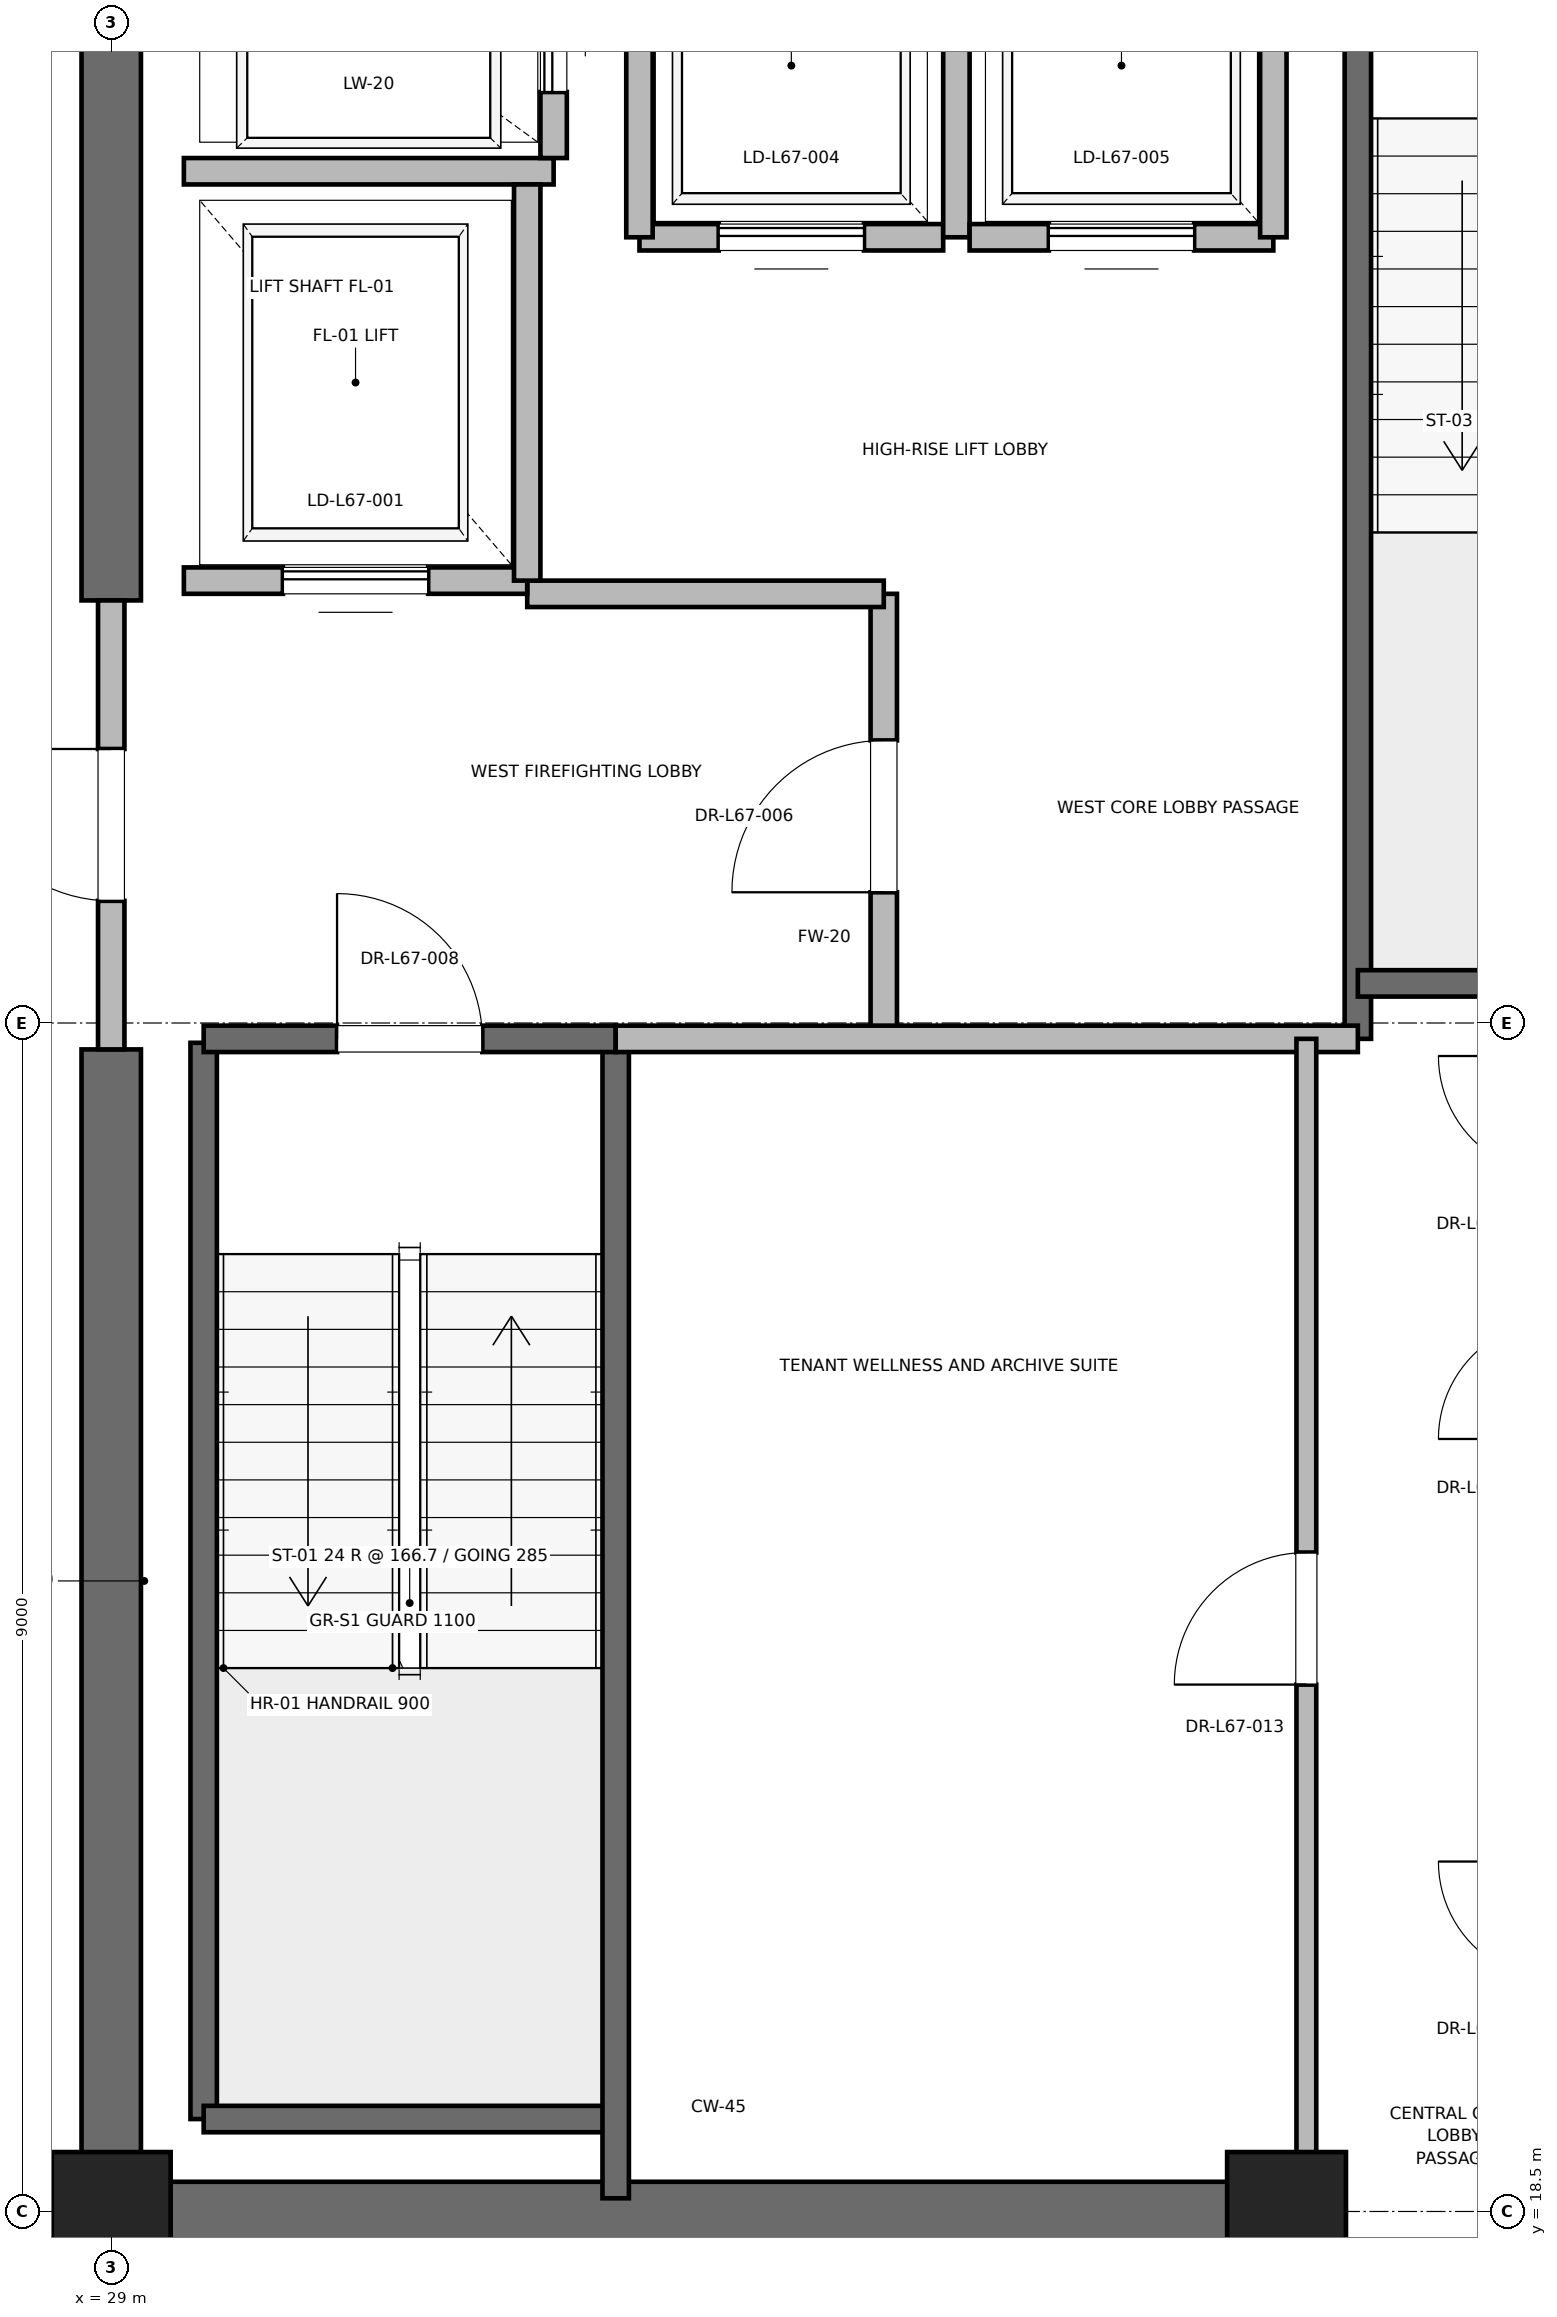
"""IFC4 building model, lengths in metres.
Left out: names, types, materials, properties, quantities, classifications, styles, units other than length and angle.
Written with IfcOpenShell. Run it as: python <this file> out.ifc"""

import sys

from ifc_helpers import new_model, si_unit, direction, frame, frame_2d, origin, origin_2d, place, context, subcontext, project, spatial, rectangle, extrude, element, fill, save


model = new_model("IFC4")
c1 = context("Model", 3, precision=1e-05, world=origin(), true_north=direction((0.0, 1.0)))
c2 = subcontext(c1, "Body", "Model", "MODEL_VIEW")
j1 = project(units=[si_unit("LENGTHUNIT", "METRE"), si_unit("PLANEANGLEUNIT", "RADIAN")], contexts=[c1])
p1 = place(None, origin())
s1 = spatial("IfcSite", under=j1, at=p1, CompositionType="ELEMENT")
p2 = place(p1, origin())
s2 = spatial("IfcBuilding", under=s1, at=p2, CompositionType="ELEMENT")
p3 = place(p2, frame((0.0, 0.0, 287.2)))
s3 = spatial("IfcBuildingStorey", under=s2, at=p3, CompositionType="ELEMENT", Elevation=287.2)
for number, where, z_axis, x_axis in (
    (1, (29.0, 18.5, 0.0), (0.0, 0.0, 1.0), (1.0, 0.0, 0.0)),
    (2, (37.9, 18.5, 0.0), (0.0, 0.0, 1.0), (1.0, 0.0, 0.0)),
):
    element("IfcColumn", number, at=place(p3, frame(where, z_axis=z_axis, x_axis=x_axis)), inside=s3, PredefinedType="PILASTER", context=c2, shape_type="SweptSolid", body=[
        extrude(rectangle(XDim=0.9, YDim=0.9, at=origin_2d()), origin(), (0.0, 0.0, 1.0), 4.0),
    ])
p4 = place(p3, frame((29.0, 18.5, 0.0), z_axis=(0.0, 0.0, 1.0), x_axis=(1.0, 0.0, 0.0)))
e3 = element("IfcWall", 3, at=p4, inside=s3, PredefinedType="SHEAR", context=c2, shape_type="SweptSolid", body=[
    extrude(rectangle(XDim=9.2, YDim=0.45, at=frame_2d((4.6, 0.0))), origin(), (0.0, 0.0, 1.0), 3.785),
])
p5 = place(p3, frame((29.0, 18.5, 0.0), z_axis=(0.0, 0.0, 1.0), x_axis=(0.0, 1.0, 0.0)))
e4 = element("IfcWall", 4, at=p5, inside=s3, PredefinedType="SHEAR", context=c2, shape_type="SweptSolid", body=[
    extrude(rectangle(XDim=8.8, YDim=0.45, at=frame_2d((4.4, 0.0))), origin(), (0.0, 0.0, 1.0), 3.785),
])
p6 = place(p3, frame((29.0, 30.7, 0.0), z_axis=(0.0, 0.0, 1.0), x_axis=(0.0, 1.0, 0.0)))
e5 = element("IfcWall", 5, at=p6, inside=s3, PredefinedType="SHEAR", context=c2, shape_type="SweptSolid", body=[
    extrude(rectangle(XDim=5.8, YDim=0.45, at=frame_2d((2.9, 0.0))), origin(), (0.0, 0.0, 1.0), 3.785),
])
p7 = place(p3, frame((29.7, 19.2, 0.0), z_axis=(0.0, 0.0, 1.0), x_axis=(0.0, 1.0, 0.0)))
e6 = element("IfcWall", 6, at=p7, inside=s3, PredefinedType="SOLIDWALL", context=c2, shape_type="SweptSolid", body=[
    extrude(rectangle(XDim=8.15, YDim=0.2, at=frame_2d((4.075, 0.0))), origin(), (0.0, 0.0, 1.0), 3.785),
])
p8 = place(p3, frame((29.7, 19.2, 0.0), z_axis=(0.0, 0.0, 1.0), x_axis=(1.0, 0.0, 0.0)))
e7 = element("IfcWall", 7, at=p8, inside=s3, PredefinedType="SOLIDWALL", context=c2, shape_type="SweptSolid", body=[
    extrude(rectangle(XDim=3.12, YDim=0.2, at=frame_2d((1.56, 0.0))), origin(), (0.0, 0.0, 1.0), 3.785),
])
p9 = place(p3, frame((32.82, 18.6, 0.0), z_axis=(0.0, 0.0, 1.0), x_axis=(0.0, 1.0, 0.0)))
e8 = element("IfcWall", 8, at=p9, inside=s3, PredefinedType="SOLIDWALL", context=c2, shape_type="SweptSolid", body=[
    extrude(rectangle(XDim=8.78, YDim=0.2, at=frame_2d((4.39, 0.0))), origin(), (0.0, 0.0, 1.0), 3.785),
])
p10 = place(p3, frame((29.7, 27.38, 0.0), z_axis=(0.0, 0.0, 1.0), x_axis=(1.0, 0.0, 0.0)))
e9 = element("IfcWall", 9, at=p10, inside=s3, PredefinedType="SOLIDWALL", context=c2, shape_type="SweptSolid", body=[
    extrude(rectangle(XDim=3.12, YDim=0.2, at=frame_2d((1.56, 0.0))), origin(), (0.0, 0.0, 1.0), 3.785),
])
p11 = place(p10, frame((1.01, 0.0, 0.0)))
e10 = element("IfcOpeningElement", 10, at=p11, cuts=e9, PredefinedType="OPENING", context=c2, shape_type="SweptSolid", body=[
    extrude(rectangle(XDim=1.1, YDim=2.15, at=frame_2d((0.55, 1.075))), frame((0.0, 0.1, 0.0), z_axis=(0.0, -1.0, 0.0), x_axis=(1.0, 0.0, 0.0)), (0.0, 0.0, 1.0), 0.2),
])
p12 = place(p3, frame((38.44, 27.38, 0.0), z_axis=(0.0, 0.0, 1.0), x_axis=(0.0, 1.0, 0.0)))
e11 = element("IfcWall", 11, at=p12, inside=s3, PredefinedType="SOLIDWALL", context=c2, shape_type="SweptSolid", body=[
    extrude(rectangle(XDim=8.87, YDim=0.2, at=frame_2d((4.435, 0.0))), origin(), (0.0, 0.0, 1.0), 3.785),
])
p13 = place(p3, frame((38.44, 27.8, 0.0), z_axis=(0.0, 0.0, 1.0), x_axis=(1.0, 0.0, 0.0)))
e12 = element("IfcWall", 12, at=p13, inside=s3, PredefinedType="SOLIDWALL", context=c2, shape_type="SweptSolid", body=[
    extrude(rectangle(XDim=3.32, YDim=0.2, at=frame_2d((1.66, 0.0))), origin(), (0.0, 0.0, 1.0), 3.785),
])
p14 = place(p3, frame((34.85, 27.38, 0.0), z_axis=(0.0, 0.0, 1.0), x_axis=(0.0, 1.0, 0.0)))
e13 = element("IfcWall", 13, at=p14, inside=s3, PredefinedType="PARTITIONING", context=c2, shape_type="SweptSolid", body=[
    extrude(rectangle(XDim=3.37, YDim=0.2, at=frame_2d((1.685, 0.0))), origin(), (0.0, 0.0, 1.0), 3.785),
])
p15 = place(p14, frame((1.11, 0.0, 0.0)))
e14 = element("IfcOpeningElement", 14, at=p15, cuts=e13, PredefinedType="OPENING", context=c2, shape_type="SweptSolid", body=[
    extrude(rectangle(XDim=1.15, YDim=2.2, at=frame_2d((0.575, 1.1))), frame((0.0, 0.1, 0.0), z_axis=(0.0, -1.0, 0.0), x_axis=(1.0, 0.0, 0.0)), (0.0, 0.0, 1.0), 0.2),
])
p16 = place(p3, frame((29.0, 27.3, 0.0), z_axis=(0.0, 0.0, 1.0), x_axis=(0.0, 1.0, 0.0)))
e15 = element("IfcWall", 15, at=p16, inside=s3, PredefinedType="PARTITIONING", context=c2, shape_type="SweptSolid", body=[
    extrude(rectangle(XDim=3.4, YDim=0.2, at=frame_2d((1.7, 0.0))), origin(), (0.0, 0.0, 1.0), 2.865),
])
p17 = place(p16, frame((1.125, 0.0, 0.0)))
e16 = element("IfcOpeningElement", 16, at=p17, cuts=e15, PredefinedType="OPENING", context=c2, shape_type="SweptSolid", body=[
    extrude(rectangle(XDim=1.15, YDim=2.2, at=frame_2d((0.575, 1.1))), frame((0.0, 0.1, 0.0), z_axis=(0.0, -1.0, 0.0), x_axis=(1.0, 0.0, 0.0)), (0.0, 0.0, 1.0), 0.2),
])
p18 = place(p3, frame((32.82, 27.38, 0.0), z_axis=(0.0, 0.0, 1.0), x_axis=(1.0, 0.0, 0.0)))
e17 = element("IfcWall", 17, at=p18, inside=s3, PredefinedType="PARTITIONING", context=c2, shape_type="SweptSolid", body=[
    extrude(rectangle(XDim=5.62, YDim=0.2, at=frame_2d((2.81, 0.0))), origin(), (0.0, 0.0, 1.0), 3.785),
])
p19 = place(p3, frame((32.15, 30.75, 0.0), z_axis=(0.0, 0.0, 1.0), x_axis=(1.0, 0.0, 0.0)))
e18 = element("IfcWall", 18, at=p19, inside=s3, PredefinedType="PARTITIONING", context=c2, shape_type="SweptSolid", body=[
    extrude(rectangle(XDim=2.7, YDim=0.2, at=frame_2d((1.35, 0.0))), origin(), (0.0, 0.0, 1.0), 3.785),
])
p20 = place(p3, frame((29.55, 30.85, 0.0), z_axis=(0.0, 0.0, 1.0), x_axis=(1.0, 0.0, 0.0)))
e19 = element("IfcWall", 19, at=p20, inside=s3, PredefinedType="SOLIDWALL", context=c2, shape_type="SweptSolid", body=[
    extrude(rectangle(XDim=2.6, YDim=0.2, at=frame_2d((1.3, 0.0))), origin(), (0.0, 0.0, 1.0), 2.865),
])
p21 = place(p20, frame((0.75, 0.0, 0.0)))
e20 = element("IfcOpeningElement", 20, at=p21, cuts=e19, PredefinedType="OPENING", context=c2, shape_type="SweptSolid", body=[
    extrude(rectangle(XDim=1.1, YDim=2.2, at=frame_2d((0.55, 1.1))), frame((0.0, 0.1, 0.0), z_axis=(0.0, -1.0, 0.0), x_axis=(1.0, 0.0, 0.0)), (0.0, 0.0, 1.0), 0.2),
])
p22 = place(p3, frame((29.55, 33.95, 0.0), z_axis=(0.0, 0.0, 1.0), x_axis=(1.0, 0.0, 0.0)))
e21 = element("IfcWall", 21, at=p22, inside=s3, PredefinedType="SOLIDWALL", context=c2, shape_type="SweptSolid", body=[
    extrude(rectangle(XDim=2.8, YDim=0.2, at=frame_2d((1.4, 0.0))), origin(), (0.0, 0.0, 1.0), 3.785),
])
p23 = place(p3, frame((32.15, 30.85, 0.0), z_axis=(0.0, 0.0, 1.0), x_axis=(0.0, 1.0, 0.0)))
e22 = element("IfcWall", 22, at=p23, inside=s3, PredefinedType="SOLIDWALL", context=c2, shape_type="SweptSolid", body=[
    extrude(rectangle(XDim=3.0, YDim=0.2, at=frame_2d((1.5, 0.0))), origin(), (0.0, 0.0, 1.0), 3.785),
])
p24 = place(p3, frame((32.35, 34.05, 0.0), z_axis=(0.0, 0.0, 1.0), x_axis=(0.0, 1.0, 0.0)))
e23 = element("IfcWall", 23, at=p24, inside=s3, PredefinedType="SOLIDWALL", context=c2, shape_type="SweptSolid", body=[
    extrude(rectangle(XDim=2.1, YDim=0.2, at=frame_2d((1.05, 0.0))), origin(), (0.0, 0.0, 1.0), 3.785),
])
p25 = place(p24, frame((0.5, 0.0, 0.0)))
e24 = element("IfcOpeningElement", 24, at=p25, cuts=e23, PredefinedType="OPENING", context=c2, shape_type="SweptSolid", body=[
    extrude(rectangle(XDim=1.1, YDim=2.2, at=frame_2d((0.55, 1.1))), frame((0.0, 0.1, 0.0), z_axis=(0.0, -1.0, 0.0), x_axis=(1.0, 0.0, 0.0)), (0.0, 0.0, 1.0), 0.2),
])
p26 = place(p3, frame((33.0, 33.45, 0.0), z_axis=(0.0, 0.0, 1.0), x_axis=(1.0, 0.0, 0.0)))
e25 = element("IfcWall", 25, at=p26, inside=s3, PredefinedType="SOLIDWALL", context=c2, shape_type="SweptSolid", body=[
    extrude(rectangle(XDim=2.3, YDim=0.2, at=frame_2d((1.15, 0.0))), origin(), (0.0, 0.0, 1.0), 3.785),
])
p27 = place(p26, frame((0.6, 0.0, 0.0)))
e26 = element("IfcOpeningElement", 26, at=p27, cuts=e25, PredefinedType="OPENING", context=c2, shape_type="SweptSolid", body=[
    extrude(rectangle(XDim=1.1, YDim=2.2, at=frame_2d((0.55, 1.1))), frame((0.0, 0.1, 0.0), z_axis=(0.0, -1.0, 0.0), x_axis=(1.0, 0.0, 0.0)), (0.0, 0.0, 1.0), 0.2),
])
p28 = place(p3, frame((33.0, 36.05, 0.0), z_axis=(0.0, 0.0, 1.0), x_axis=(0.0, -1.0, 0.0)))
e27 = element("IfcWall", 27, at=p28, inside=s3, PredefinedType="SOLIDWALL", context=c2, shape_type="SweptSolid", body=[
    extrude(rectangle(XDim=2.6, YDim=0.2, at=frame_2d((1.3, 0.0))), origin(), (0.0, 0.0, 1.0), 3.785),
])
p29 = place(p3, frame((35.4, 33.45, 0.0), z_axis=(0.0, 0.0, 1.0), x_axis=(0.0, 1.0, 0.0)))
e28 = element("IfcWall", 28, at=p29, inside=s3, PredefinedType="SOLIDWALL", context=c2, shape_type="SweptSolid", body=[
    extrude(rectangle(XDim=2.6, YDim=0.2, at=frame_2d((1.3, 0.0))), origin(), (0.0, 0.0, 1.0), 2.865),
])
p30 = place(p3, frame((35.5, 33.45, 0.0), z_axis=(0.0, 0.0, 1.0), x_axis=(1.0, 0.0, 0.0)))
e29 = element("IfcWall", 29, at=p30, inside=s3, PredefinedType="SOLIDWALL", context=c2, shape_type="SweptSolid", body=[
    extrude(rectangle(XDim=2.3, YDim=0.2, at=frame_2d((1.15, 0.0))), origin(), (0.0, 0.0, 1.0), 3.785),
])
p31 = place(p30, frame((0.6, 0.0, 0.0)))
e30 = element("IfcOpeningElement", 30, at=p31, cuts=e29, PredefinedType="OPENING", context=c2, shape_type="SweptSolid", body=[
    extrude(rectangle(XDim=1.1, YDim=2.2, at=frame_2d((0.55, 1.1))), frame((0.0, 0.1, 0.0), z_axis=(0.0, -1.0, 0.0), x_axis=(1.0, 0.0, 0.0)), (0.0, 0.0, 1.0), 0.2),
])
p32 = place(p3, frame((37.8, 33.45, 0.0), z_axis=(0.0, 0.0, 1.0), x_axis=(0.0, 1.0, 0.0)))
e31 = element("IfcWall", 31, at=p32, inside=s3, PredefinedType="SOLIDWALL", context=c2, shape_type="SweptSolid", body=[
    extrude(rectangle(XDim=2.6, YDim=0.2, at=frame_2d((1.3, 0.0))), origin(), (0.0, 0.0, 1.0), 2.865),
])
p33 = place(p3, frame((38.05, 18.6, 0.0), z_axis=(0.0, 0.0, 1.0), x_axis=(0.0, 1.0, 0.0)))
e32 = element("IfcWall", 32, at=p33, inside=s3, PredefinedType="PARTITIONING", context=c2, shape_type="SweptSolid", body=[
    extrude(rectangle(XDim=8.78, YDim=0.15, at=frame_2d((4.39, 0.0))), origin(), (0.0, 0.0, 1.0), 2.85),
])
p34 = place(p33, frame((3.89, 0.0, 0.0)))
e33 = element("IfcOpeningElement", 33, at=p34, cuts=e32, PredefinedType="OPENING", context=c2, shape_type="SweptSolid", body=[
    extrude(rectangle(XDim=1.0, YDim=2.15, at=frame_2d((0.5, 1.075))), frame((0.0, 0.075, 0.0), z_axis=(0.0, -1.0, 0.0), x_axis=(1.0, 0.0, 0.0)), (0.0, 0.0, 1.0), 0.15),
])
p35 = place(p11, origin())
e34 = element("IfcDoor", 34, at=p35, inside=s3, OperationType="SINGLE_SWING_LEFT", PredefinedType="DOOR", context=c2, shape_type="SweptSolid", body=[
    extrude(rectangle(XDim=1.1, YDim=2.15, at=frame_2d((0.55, 1.075))), frame((0.0, 0.025, 0.0), z_axis=(0.0, -1.0, 0.0), x_axis=(1.0, 0.0, 0.0)), (0.0, 0.0, 1.0), 0.05),
])
fill(e10, e34)
p36 = place(p15, origin())
e35 = element("IfcDoor", 35, at=p36, inside=s3, OperationType="SINGLE_SWING_LEFT", PredefinedType="DOOR", context=c2, shape_type="SweptSolid", body=[
    extrude(rectangle(XDim=1.15, YDim=2.2, at=frame_2d((0.575, 1.1))), frame((0.0, 0.025, 0.0), z_axis=(0.0, -1.0, 0.0), x_axis=(1.0, 0.0, 0.0)), (0.0, 0.0, 1.0), 0.05),
])
fill(e14, e35)
p37 = place(p17, origin())
e36 = element("IfcDoor", 36, at=p37, inside=s3, OperationType="SINGLE_SWING_RIGHT", PredefinedType="DOOR", context=c2, shape_type="SweptSolid", body=[
    extrude(rectangle(XDim=1.15, YDim=2.2, at=frame_2d((0.575, 1.1))), frame((0.0, 0.025, 0.0), z_axis=(0.0, -1.0, 0.0), x_axis=(1.0, 0.0, 0.0)), (0.0, 0.0, 1.0), 0.05),
])
fill(e16, e36)
p38 = place(p21, origin())
e37 = element("IfcDoor", 37, at=p38, inside=s3, OperationType="SLIDING_TO_RIGHT", PredefinedType="DOOR", context=c2, shape_type="SweptSolid", body=[
    extrude(rectangle(XDim=1.1, YDim=2.2, at=frame_2d((0.55, 1.1))), frame((0.0, 0.025, 0.0), z_axis=(0.0, -1.0, 0.0), x_axis=(1.0, 0.0, 0.0)), (0.0, 0.0, 1.0), 0.05),
])
fill(e20, e37)
p39 = place(p25, origin())
e38 = element("IfcDoor", 38, at=p39, inside=s3, OperationType="SLIDING_TO_RIGHT", PredefinedType="DOOR", context=c2, shape_type="SweptSolid", body=[
    extrude(rectangle(XDim=1.1, YDim=2.2, at=frame_2d((0.55, 1.1))), frame((0.0, 0.025, 0.0), z_axis=(0.0, -1.0, 0.0), x_axis=(1.0, 0.0, 0.0)), (0.0, 0.0, 1.0), 0.05),
])
fill(e24, e38)
p40 = place(p27, origin())
e39 = element("IfcDoor", 39, at=p40, inside=s3, OperationType="SLIDING_TO_RIGHT", PredefinedType="DOOR", context=c2, shape_type="SweptSolid", body=[
    extrude(rectangle(XDim=1.1, YDim=2.2, at=frame_2d((0.55, 1.1))), frame((0.0, 0.025, 0.0), z_axis=(0.0, -1.0, 0.0), x_axis=(1.0, 0.0, 0.0)), (0.0, 0.0, 1.0), 0.05),
])
fill(e26, e39)
p41 = place(p31, origin())
e40 = element("IfcDoor", 40, at=p41, inside=s3, OperationType="SLIDING_TO_RIGHT", PredefinedType="DOOR", context=c2, shape_type="SweptSolid", body=[
    extrude(rectangle(XDim=1.1, YDim=2.2, at=frame_2d((0.55, 1.1))), frame((0.0, 0.025, 0.0), z_axis=(0.0, -1.0, 0.0), x_axis=(1.0, 0.0, 0.0)), (0.0, 0.0, 1.0), 0.05),
])
fill(e30, e40)
p42 = place(p34, origin())
e41 = element("IfcDoor", 41, at=p42, inside=s3, OperationType="SINGLE_SWING_LEFT", PredefinedType="DOOR", context=c2, shape_type="SweptSolid", body=[
    extrude(rectangle(XDim=1.0, YDim=2.15, at=frame_2d((0.5, 1.075))), frame((0.0, 0.025, 0.0), z_axis=(0.0, -1.0, 0.0), x_axis=(1.0, 0.0, 0.0)), (0.0, 0.0, 1.0), 0.05),
])
fill(e33, e41)
save(model, sys.argv[1])
